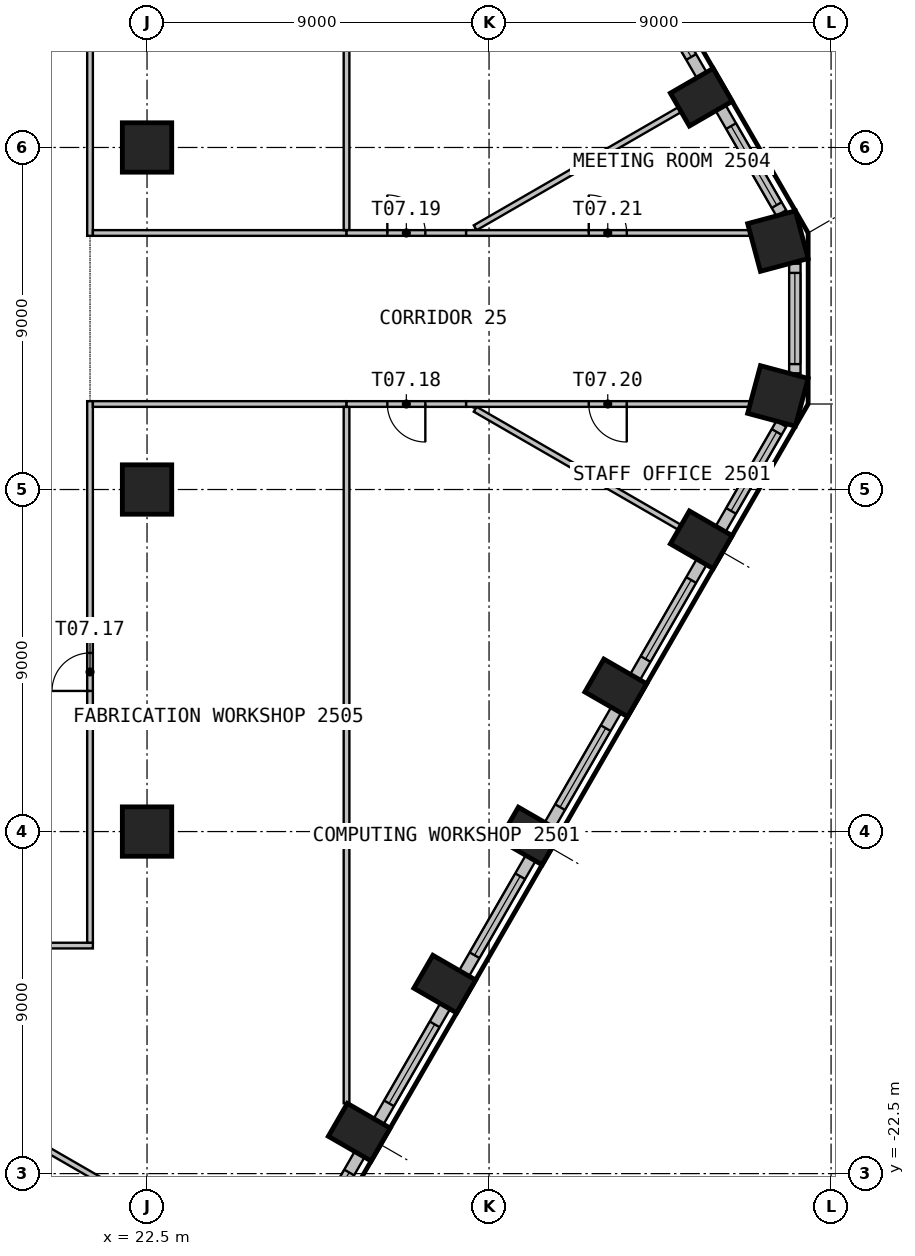
"""IFC4 building model, lengths in metres.
Left out: names, types, materials, properties, quantities, classifications, styles, units other than length and angle.
Written with IfcOpenShell. Run it as: python <this file> out.ifc"""

import sys

from ifc_helpers import new_model, si_unit, direction, frame, frame_2d, origin, origin_2d, place, context, subcontext, project, spatial, rectangle, circle, extrude, element, fill, save


model = new_model("IFC4")
c1 = context("Model", 3, precision=1e-05, world=origin(), true_north=direction((0.0, 1.0)))
c2 = subcontext(c1, "Body", "Model", "MODEL_VIEW")
j1 = project(units=[si_unit("LENGTHUNIT", "METRE"), si_unit("PLANEANGLEUNIT", "RADIAN")], contexts=[c1])
p1 = place(None, origin())
s1 = spatial("IfcSite", under=j1, at=p1, CompositionType="ELEMENT")
p2 = place(p1, origin())
s2 = spatial("IfcBuilding", under=s1, at=p2, CompositionType="ELEMENT")
p3 = place(p2, frame((0.0, 0.0, 104.7)))
s3 = spatial("IfcBuildingStorey", under=s2, at=p3, CompositionType="ELEMENT", Elevation=104.7)
for number, where, z_axis, x_axis in (
    (1, (28.084, -21.411, 0.0), (0.0, 0.0, 1.0), (0.5, 0.866, 0.0)),
    (2, (30.334, -17.513, 0.0), (0.0, 0.0, 1.0), (0.5, 0.866, 0.0)),
    (3, (32.584, -13.616, 0.0), (0.0, 0.0, 1.0), (0.5, 0.866, 0.0)),
    (4, (34.834, -9.719, 0.0), (0.0, 0.0, 1.0), (0.5, 0.866, 0.0)),
    (5, (37.084, -5.822, 0.0), (0.0, 0.0, 1.0), (0.5, 0.866, 0.0)),
):
    element("IfcColumn", number, at=place(p3, frame(where, z_axis=z_axis, x_axis=x_axis)), inside=s3, PredefinedType="COLUMN", context=c2, shape_type="SweptSolid", body=[
        extrude(rectangle(XDim=1.0, YDim=1.3, at=origin_2d()), origin(), (0.0, 0.0, 1.0), 3.525),
    ])
for number, where, z_axis, x_axis in (
    (6, (39.101, -2.037, 0.0), (0.0, 0.0, 1.0), (0.259, 0.966, 0.0)),
    (7, (39.101, 2.037, 0.0), (0.0, 0.0, 1.0), (-0.259, 0.966, 0.0)),
):
    element("IfcColumn", number, at=place(p3, frame(where, z_axis=z_axis, x_axis=x_axis)), inside=s3, PredefinedType="COLUMN", context=c2, shape_type="SweptSolid", body=[
        extrude(rectangle(XDim=1.3, YDim=1.3, at=origin_2d()), origin(), (0.0, 0.0, 1.0), 3.525),
    ])
p4 = place(p3, frame((37.084, 5.822, 0.0), z_axis=(0.0, 0.0, 1.0), x_axis=(-0.5, 0.866025403784, 0.0)))
e8 = element("IfcColumn", 8, at=p4, inside=s3, PredefinedType="COLUMN", context=c2, shape_type="SweptSolid", body=[
    extrude(rectangle(XDim=1.0, YDim=1.3, at=origin_2d()), origin(), (0.0, 0.0, 1.0), 3.525),
])
for number, where, z_axis, x_axis in (
    (9, (22.5, -13.5, 0.0), (0.0, 0.0, 1.0), (1.0, 0.0, 0.0)),
    (10, (22.5, -4.5, 0.0), (0.0, 0.0, 1.0), (1.0, 0.0, 0.0)),
    (11, (22.5, 4.5, 0.0), (0.0, 0.0, 1.0), (1.0, 0.0, 0.0)),
):
    element("IfcColumn", number, at=place(p3, frame(where, z_axis=z_axis, x_axis=x_axis)), inside=s3, PredefinedType="COLUMN", context=c2, shape_type="SweptSolid", body=[
        extrude(circle(Radius=0.65, at=origin_2d()), origin(), (0.0, 0.0, 1.0), 3.525),
    ])
p5 = place(p3, frame((26.344, -25.024, 0.0), z_axis=(0.0, 0.0, 1.0), x_axis=(0.499996256241, 0.866027565234, 0.0)))
e12 = element("IfcWall", 12, at=p5, inside=s3, PredefinedType="SOLIDWALL", context=c2, shape_type="SweptSolid", body=[
    extrude(rectangle(XDim=3.499, YDim=0.3, at=frame_2d((1.75, 0.0))), origin(), (0.0, 0.0, 1.0), 3.525),
])
p6 = place(p5, frame((0.55, 0.0, 0.9)))
e13 = element("IfcOpeningElement", 13, at=p6, cuts=e12, PredefinedType="OPENING", context=c2, shape_type="SweptSolid", body=[
    extrude(rectangle(XDim=2.4, YDim=2.1, at=frame_2d((1.2, 1.05))), frame((0.0, 0.16, 0.0), z_axis=(0.0, -1.0, 0.0), x_axis=(1.0, 0.0, 0.0)), (0.0, 0.0, 1.0), 0.32),
])
p7 = place(p3, frame((28.594, -21.127, 0.0), z_axis=(0.0, 0.0, 1.0), x_axis=(0.499996256241, 0.866027565234, 0.0)))
e14 = element("IfcWall", 14, at=p7, inside=s3, PredefinedType="SOLIDWALL", context=c2, shape_type="SweptSolid", body=[
    extrude(rectangle(XDim=3.499, YDim=0.3, at=frame_2d((1.75, 0.0))), origin(), (0.0, 0.0, 1.0), 3.525),
])
p8 = place(p7, frame((0.55, 0.0, 0.9)))
e15 = element("IfcOpeningElement", 15, at=p8, cuts=e14, PredefinedType="OPENING", context=c2, shape_type="SweptSolid", body=[
    extrude(rectangle(XDim=2.4, YDim=2.1, at=frame_2d((1.2, 1.05))), frame((0.0, 0.16, 0.0), z_axis=(0.0, -1.0, 0.0), x_axis=(1.0, 0.0, 0.0)), (0.0, 0.0, 1.0), 0.32),
])
p9 = place(p3, frame((30.844, -17.23, 0.0), z_axis=(0.0, 0.0, 1.0), x_axis=(0.499996256241, 0.866027565234, 0.0)))
e16 = element("IfcWall", 16, at=p9, inside=s3, PredefinedType="SOLIDWALL", context=c2, shape_type="SweptSolid", body=[
    extrude(rectangle(XDim=3.499, YDim=0.3, at=frame_2d((1.75, 0.0))), origin(), (0.0, 0.0, 1.0), 3.525),
])
p10 = place(p9, frame((0.55, 0.0, 0.9)))
e17 = element("IfcOpeningElement", 17, at=p10, cuts=e16, PredefinedType="OPENING", context=c2, shape_type="SweptSolid", body=[
    extrude(rectangle(XDim=2.4, YDim=2.1, at=frame_2d((1.2, 1.05))), frame((0.0, 0.16, 0.0), z_axis=(0.0, -1.0, 0.0), x_axis=(1.0, 0.0, 0.0)), (0.0, 0.0, 1.0), 0.32),
])
p11 = place(p3, frame((33.094, -13.333, 0.0), z_axis=(0.0, 0.0, 1.0), x_axis=(0.499996256241, 0.866027565234, 0.0)))
e18 = element("IfcWall", 18, at=p11, inside=s3, PredefinedType="SOLIDWALL", context=c2, shape_type="SweptSolid", body=[
    extrude(rectangle(XDim=3.499, YDim=0.3, at=frame_2d((1.75, 0.0))), origin(), (0.0, 0.0, 1.0), 3.525),
])
p12 = place(p11, frame((0.55, 0.0, 0.9)))
e19 = element("IfcOpeningElement", 19, at=p12, cuts=e18, PredefinedType="OPENING", context=c2, shape_type="SweptSolid", body=[
    extrude(rectangle(XDim=2.4, YDim=2.1, at=frame_2d((1.2, 1.05))), frame((0.0, 0.16, 0.0), z_axis=(0.0, -1.0, 0.0), x_axis=(1.0, 0.0, 0.0)), (0.0, 0.0, 1.0), 0.32),
])
p13 = place(p3, frame((35.344, -9.436, 0.0), z_axis=(0.0, 0.0, 1.0), x_axis=(0.499996256241, 0.866027565234, 0.0)))
e20 = element("IfcWall", 20, at=p13, inside=s3, PredefinedType="SOLIDWALL", context=c2, shape_type="SweptSolid", body=[
    extrude(rectangle(XDim=3.499, YDim=0.3, at=frame_2d((1.75, 0.0))), origin(), (0.0, 0.0, 1.0), 3.525),
])
p14 = place(p13, frame((0.55, 0.0, 0.9)))
e21 = element("IfcOpeningElement", 21, at=p14, cuts=e20, PredefinedType="OPENING", context=c2, shape_type="SweptSolid", body=[
    extrude(rectangle(XDim=2.4, YDim=2.1, at=frame_2d((1.2, 1.05))), frame((0.0, 0.16, 0.0), z_axis=(0.0, -1.0, 0.0), x_axis=(1.0, 0.0, 0.0)), (0.0, 0.0, 1.0), 0.32),
])
p15 = place(p3, frame((37.594, -5.539, 0.0), z_axis=(0.0, 0.0, 1.0), x_axis=(0.500004907028, 0.866022570692, 0.0)))
e22 = element("IfcWall", 22, at=p15, inside=s3, PredefinedType="SOLIDWALL", context=c2, shape_type="SweptSolid", body=[
    extrude(rectangle(XDim=3.192, YDim=0.3, at=frame_2d((1.596, 0.0))), origin(), (0.0, 0.0, 1.0), 3.525),
])
p16 = place(p15, frame((0.55, 0.0, 0.9)))
e23 = element("IfcOpeningElement", 23, at=p16, cuts=e22, PredefinedType="OPENING", context=c2, shape_type="SweptSolid", body=[
    extrude(rectangle(XDim=2.4, YDim=2.1, at=frame_2d((1.2, 1.05))), frame((0.0, 0.16, 0.0), z_axis=(0.0, -1.0, 0.0), x_axis=(1.0, 0.0, 0.0)), (0.0, 0.0, 1.0), 0.32),
])
p17 = place(p3, frame((39.547, -1.443, 0.0), z_axis=(0.0, 0.0, 1.0), x_axis=(0.0, 1.0, 0.0)))
e24 = element("IfcWall", 24, at=p17, inside=s3, PredefinedType="SOLIDWALL", context=c2, shape_type="SweptSolid", body=[
    extrude(rectangle(XDim=2.886, YDim=0.3, at=frame_2d((1.443, 0.0))), origin(), (0.0, 0.0, 1.0), 3.525),
])
p18 = place(p17, frame((0.243, 0.0, 0.9)))
e25 = element("IfcOpeningElement", 25, at=p18, cuts=e24, PredefinedType="OPENING", context=c2, shape_type="SweptSolid", body=[
    extrude(rectangle(XDim=2.4, YDim=2.1, at=frame_2d((1.2, 1.05))), frame((0.0, 0.16, 0.0), z_axis=(0.0, -1.0, 0.0), x_axis=(1.0, 0.0, 0.0)), (0.0, 0.0, 1.0), 0.32),
])
p19 = place(p3, frame((39.19, 2.774, 0.0), z_axis=(0.0, 0.0, 1.0), x_axis=(-0.500004907028, 0.866022570692, 0.0)))
e26 = element("IfcWall", 26, at=p19, inside=s3, PredefinedType="SOLIDWALL", context=c2, shape_type="SweptSolid", body=[
    extrude(rectangle(XDim=3.192, YDim=0.3, at=frame_2d((1.596, 0.0))), origin(), (0.0, 0.0, 1.0), 3.525),
])
p20 = place(p19, frame((0.243, 0.0, 0.9)))
e27 = element("IfcOpeningElement", 27, at=p20, cuts=e26, PredefinedType="OPENING", context=c2, shape_type="SweptSolid", body=[
    extrude(rectangle(XDim=2.4, YDim=2.1, at=frame_2d((1.2, 1.05))), frame((0.0, 0.16, 0.0), z_axis=(0.0, -1.0, 0.0), x_axis=(1.0, 0.0, 0.0)), (0.0, 0.0, 1.0), 0.32),
])
p21 = place(p3, frame((37.094, 6.406, 0.0), z_axis=(0.0, 0.0, 1.0), x_axis=(-0.499996256241, 0.866027565234, 0.0)))
e28 = element("IfcWall", 28, at=p21, inside=s3, PredefinedType="SOLIDWALL", context=c2, shape_type="SweptSolid", body=[
    extrude(rectangle(XDim=3.499, YDim=0.3, at=frame_2d((1.75, 0.0))), origin(), (0.0, 0.0, 1.0), 3.525),
])
p22 = place(p21, frame((0.55, 0.0, 0.9)))
e29 = element("IfcOpeningElement", 29, at=p22, cuts=e28, PredefinedType="OPENING", context=c2, shape_type="SweptSolid", body=[
    extrude(rectangle(XDim=2.4, YDim=2.1, at=frame_2d((1.2, 1.05))), frame((0.0, 0.16, 0.0), z_axis=(0.0, -1.0, 0.0), x_axis=(1.0, 0.0, 0.0)), (0.0, 0.0, 1.0), 0.32),
])
p23 = place(p3, frame((11.315, -16.925, 0.0), z_axis=(0.0, 0.0, 1.0), x_axis=(0.86600725109, -0.500031440071, 0.0)))
e30 = element("IfcWall", 30, at=p23, inside=s3, PredefinedType="PARTITIONING", context=c2, shape_type="SweptSolid", body=[
    extrude(rectangle(XDim=16.096, YDim=0.15, at=frame_2d((8.048, 0.0))), origin(), (0.0, 0.0, 1.0), 3.525),
])
p24 = place(p3, frame((11.25, -16.5, 0.0), z_axis=(0.0, 0.0, 1.0), x_axis=(1.0, 0.0, 0.0)))
e31 = element("IfcWall", 31, at=p24, inside=s3, PredefinedType="PARTITIONING", context=c2, shape_type="SweptSolid", body=[
    extrude(rectangle(XDim=9.825, YDim=0.15, at=frame_2d((4.913, 0.0))), origin(), (0.0, 0.0, 1.0), 3.525),
])
p25 = place(p3, frame((21.0, -16.425, 0.0), z_axis=(0.0, 0.0, 1.0), x_axis=(0.0, 1.0, 0.0)))
e32 = element("IfcWall", 32, at=p25, inside=s3, PredefinedType="PARTITIONING", context=c2, shape_type="SweptSolid", body=[
    extrude(rectangle(XDim=14.25, YDim=0.15, at=frame_2d((7.125, 0.0))), origin(), (0.0, 0.0, 1.0), 3.525),
])
p26 = place(p25, frame((6.625, 0.0, 0.0)))
e33 = element("IfcOpeningElement", 33, at=p26, cuts=e32, PredefinedType="OPENING", context=c2, shape_type="SweptSolid", body=[
    extrude(rectangle(XDim=1.0, YDim=2.1, at=frame_2d((0.5, 1.05))), frame((0.0, 0.085, 0.0), z_axis=(0.0, -1.0, 0.0), x_axis=(1.0, 0.0, 0.0)), (0.0, 0.0, 1.0), 0.17),
])
p27 = place(p3, frame((27.75, -2.25, 0.0), z_axis=(0.0, 0.0, 1.0), x_axis=(-1.0, 0.0, 0.0)))
e34 = element("IfcWall", 34, at=p27, inside=s3, PredefinedType="PARTITIONING", context=c2, shape_type="SweptSolid", body=[
    extrude(rectangle(XDim=6.675, YDim=0.15, at=frame_2d((3.337, 0.0))), origin(), (0.0, 0.0, 1.0), 3.525),
])
p28 = place(p3, frame((21.0, 2.175, 0.0), z_axis=(0.0, 0.0, 1.0), x_axis=(0.0, 1.0, 0.0)))
e35 = element("IfcWall", 35, at=p28, inside=s3, PredefinedType="PARTITIONING", context=c2, shape_type="SweptSolid", body=[
    extrude(rectangle(XDim=14.25, YDim=0.15, at=frame_2d((7.125, 0.0))), origin(), (0.0, 0.0, 1.0), 3.525),
])
p29 = place(p28, frame((6.625, 0.0, 0.0)))
e36 = element("IfcOpeningElement", 36, at=p29, cuts=e35, PredefinedType="OPENING", context=c2, shape_type="SweptSolid", body=[
    extrude(rectangle(XDim=1.0, YDim=2.1, at=frame_2d((0.5, 1.05))), frame((0.0, 0.085, 0.0), z_axis=(0.0, -1.0, 0.0), x_axis=(1.0, 0.0, 0.0)), (0.0, 0.0, 1.0), 0.17),
])
p30 = place(p3, frame((21.075, 2.25, 0.0), z_axis=(0.0, 0.0, 1.0), x_axis=(1.0, 0.0, 0.0)))
e37 = element("IfcWall", 37, at=p30, inside=s3, PredefinedType="PARTITIONING", context=c2, shape_type="SweptSolid", body=[
    extrude(rectangle(XDim=6.675, YDim=0.15, at=frame_2d((3.337, 0.0))), origin(), (0.0, 0.0, 1.0), 3.525),
])
p31 = place(p3, frame((27.75, -2.325, 0.0), z_axis=(0.0, 0.0, 1.0), x_axis=(0.0, -1.0, 0.0)))
e38 = element("IfcWall", 38, at=p31, inside=s3, PredefinedType="PARTITIONING", context=c2, shape_type="SweptSolid", body=[
    extrude(rectangle(XDim=18.324, YDim=0.15, at=frame_2d((9.162, 0.0))), origin(), (0.0, 0.0, 1.0), 3.525),
])
p32 = place(p3, frame((30.897, -2.25, 0.0), z_axis=(0.0, 0.0, 1.0), x_axis=(-1.0, 0.0, 0.0)))
e39 = element("IfcWall", 39, at=p32, inside=s3, PredefinedType="PARTITIONING", context=c2, shape_type="SweptSolid", body=[
    extrude(rectangle(XDim=3.147, YDim=0.15, at=frame_2d((1.573, 0.0))), origin(), (0.0, 0.0, 1.0), 3.525),
])
p33 = place(p32, frame((1.073, 0.0, 0.0)))
e40 = element("IfcOpeningElement", 40, at=p33, cuts=e39, PredefinedType="OPENING", context=c2, shape_type="SweptSolid", body=[
    extrude(rectangle(XDim=1.0, YDim=2.1, at=frame_2d((0.5, 1.05))), frame((0.0, 0.085, 0.0), z_axis=(0.0, -1.0, 0.0), x_axis=(1.0, 0.0, 0.0)), (0.0, 0.0, 1.0), 0.17),
])
p34 = place(p3, frame((27.75, 20.649, 0.0), z_axis=(0.0, 0.0, 1.0), x_axis=(0.0, -1.0, 0.0)))
e41 = element("IfcWall", 41, at=p34, inside=s3, PredefinedType="PARTITIONING", context=c2, shape_type="SweptSolid", body=[
    extrude(rectangle(XDim=18.324, YDim=0.15, at=frame_2d((9.162, 0.0))), origin(), (0.0, 0.0, 1.0), 3.525),
])
p35 = place(p3, frame((27.75, 2.25, 0.0), z_axis=(0.0, 0.0, 1.0), x_axis=(1.0, 0.0, 0.0)))
e42 = element("IfcWall", 42, at=p35, inside=s3, PredefinedType="PARTITIONING", context=c2, shape_type="SweptSolid", body=[
    extrude(rectangle(XDim=3.147, YDim=0.15, at=frame_2d((1.573, 0.0))), origin(), (0.0, 0.0, 1.0), 3.525),
])
p36 = place(p35, frame((1.073, 0.0, 0.0)))
e43 = element("IfcOpeningElement", 43, at=p36, cuts=e42, PredefinedType="OPENING", context=c2, shape_type="SweptSolid", body=[
    extrude(rectangle(XDim=1.0, YDim=2.1, at=frame_2d((0.5, 1.05))), frame((0.0, 0.085, 0.0), z_axis=(0.0, -1.0, 0.0), x_axis=(1.0, 0.0, 0.0)), (0.0, 0.0, 1.0), 0.17),
])
p37 = place(p3, frame((31.135, -2.387, 0.0), z_axis=(0.0, 0.0, 1.0), x_axis=(0.866007197923, -0.500031532152, 0.0)))
e44 = element("IfcWall", 44, at=p37, inside=s3, PredefinedType="PARTITIONING", context=c2, shape_type="SweptSolid", body=[
    extrude(rectangle(XDim=6.199, YDim=0.15, at=frame_2d((3.1, 0.0))), origin(), (0.0, 0.0, 1.0), 3.525),
])
p38 = place(p3, frame((38.35, -2.25, 0.0), z_axis=(0.0, 0.0, 1.0), x_axis=(-1.0, 0.0, 0.0)))
e45 = element("IfcWall", 45, at=p38, inside=s3, PredefinedType="PARTITIONING", context=c2, shape_type="SweptSolid", body=[
    extrude(rectangle(XDim=7.453, YDim=0.15, at=frame_2d((3.727, 0.0))), origin(), (0.0, 0.0, 1.0), 3.525),
])
p39 = place(p38, frame((3.227, 0.0, 0.0)))
e46 = element("IfcOpeningElement", 46, at=p39, cuts=e45, PredefinedType="OPENING", context=c2, shape_type="SweptSolid", body=[
    extrude(rectangle(XDim=1.0, YDim=2.1, at=frame_2d((0.5, 1.05))), frame((0.0, 0.085, 0.0), z_axis=(0.0, -1.0, 0.0), x_axis=(1.0, 0.0, 0.0)), (0.0, 0.0, 1.0), 0.17),
])
p40 = place(p3, frame((36.504, 5.487, 0.0), z_axis=(0.0, 0.0, 1.0), x_axis=(-0.866007197923, -0.500031532152, 0.0)))
e47 = element("IfcWall", 47, at=p40, inside=s3, PredefinedType="PARTITIONING", context=c2, shape_type="SweptSolid", body=[
    extrude(rectangle(XDim=6.199, YDim=0.15, at=frame_2d((3.1, 0.0))), origin(), (0.0, 0.0, 1.0), 3.525),
])
p41 = place(p3, frame((30.897, 2.25, 0.0), z_axis=(0.0, 0.0, 1.0), x_axis=(1.0, 0.0, 0.0)))
e48 = element("IfcWall", 48, at=p41, inside=s3, PredefinedType="PARTITIONING", context=c2, shape_type="SweptSolid", body=[
    extrude(rectangle(XDim=7.453, YDim=0.15, at=frame_2d((3.727, 0.0))), origin(), (0.0, 0.0, 1.0), 3.525),
])
p42 = place(p41, frame((3.227, 0.0, 0.0)))
e49 = element("IfcOpeningElement", 49, at=p42, cuts=e48, PredefinedType="OPENING", context=c2, shape_type="SweptSolid", body=[
    extrude(rectangle(XDim=1.0, YDim=2.1, at=frame_2d((0.5, 1.05))), frame((0.0, 0.085, 0.0), z_axis=(0.0, -1.0, 0.0), x_axis=(1.0, 0.0, 0.0)), (0.0, 0.0, 1.0), 0.17),
])
p43 = place(p6, origin())
e50 = element("IfcWindow", 50, at=p43, inside=s3, PartitioningType="SINGLE_PANEL", PredefinedType="WINDOW", context=c2, shape_type="SweptSolid", body=[
    extrude(rectangle(XDim=2.4, YDim=2.1, at=frame_2d((1.2, 1.05))), frame((0.0, 0.03, 0.0), z_axis=(0.0, -1.0, 0.0), x_axis=(1.0, 0.0, 0.0)), (0.0, 0.0, 1.0), 0.06),
])
fill(e13, e50)
p44 = place(p8, origin())
e51 = element("IfcWindow", 51, at=p44, inside=s3, PartitioningType="SINGLE_PANEL", PredefinedType="WINDOW", context=c2, shape_type="SweptSolid", body=[
    extrude(rectangle(XDim=2.4, YDim=2.1, at=frame_2d((1.2, 1.05))), frame((0.0, 0.03, 0.0), z_axis=(0.0, -1.0, 0.0), x_axis=(1.0, 0.0, 0.0)), (0.0, 0.0, 1.0), 0.06),
])
fill(e15, e51)
p45 = place(p10, origin())
e52 = element("IfcWindow", 52, at=p45, inside=s3, PartitioningType="SINGLE_PANEL", PredefinedType="WINDOW", context=c2, shape_type="SweptSolid", body=[
    extrude(rectangle(XDim=2.4, YDim=2.1, at=frame_2d((1.2, 1.05))), frame((0.0, 0.03, 0.0), z_axis=(0.0, -1.0, 0.0), x_axis=(1.0, 0.0, 0.0)), (0.0, 0.0, 1.0), 0.06),
])
fill(e17, e52)
p46 = place(p12, origin())
e53 = element("IfcWindow", 53, at=p46, inside=s3, PartitioningType="SINGLE_PANEL", PredefinedType="WINDOW", context=c2, shape_type="SweptSolid", body=[
    extrude(rectangle(XDim=2.4, YDim=2.1, at=frame_2d((1.2, 1.05))), frame((0.0, 0.03, 0.0), z_axis=(0.0, -1.0, 0.0), x_axis=(1.0, 0.0, 0.0)), (0.0, 0.0, 1.0), 0.06),
])
fill(e19, e53)
p47 = place(p14, origin())
e54 = element("IfcWindow", 54, at=p47, inside=s3, PartitioningType="SINGLE_PANEL", PredefinedType="WINDOW", context=c2, shape_type="SweptSolid", body=[
    extrude(rectangle(XDim=2.4, YDim=2.1, at=frame_2d((1.2, 1.05))), frame((0.0, 0.03, 0.0), z_axis=(0.0, -1.0, 0.0), x_axis=(1.0, 0.0, 0.0)), (0.0, 0.0, 1.0), 0.06),
])
fill(e21, e54)
p48 = place(p16, origin())
e55 = element("IfcWindow", 55, at=p48, inside=s3, PartitioningType="SINGLE_PANEL", PredefinedType="WINDOW", context=c2, shape_type="SweptSolid", body=[
    extrude(rectangle(XDim=2.4, YDim=2.1, at=frame_2d((1.2, 1.05))), frame((0.0, 0.03, 0.0), z_axis=(0.0, -1.0, 0.0), x_axis=(1.0, 0.0, 0.0)), (0.0, 0.0, 1.0), 0.06),
])
fill(e23, e55)
p49 = place(p18, origin())
e56 = element("IfcWindow", 56, at=p49, inside=s3, PartitioningType="SINGLE_PANEL", PredefinedType="WINDOW", context=c2, shape_type="SweptSolid", body=[
    extrude(rectangle(XDim=2.4, YDim=2.1, at=frame_2d((1.2, 1.05))), frame((0.0, 0.03, 0.0), z_axis=(0.0, -1.0, 0.0), x_axis=(1.0, 0.0, 0.0)), (0.0, 0.0, 1.0), 0.06),
])
fill(e25, e56)
p50 = place(p20, origin())
e57 = element("IfcWindow", 57, at=p50, inside=s3, PartitioningType="SINGLE_PANEL", PredefinedType="WINDOW", context=c2, shape_type="SweptSolid", body=[
    extrude(rectangle(XDim=2.4, YDim=2.1, at=frame_2d((1.2, 1.05))), frame((0.0, 0.03, 0.0), z_axis=(0.0, -1.0, 0.0), x_axis=(1.0, 0.0, 0.0)), (0.0, 0.0, 1.0), 0.06),
])
fill(e27, e57)
p51 = place(p22, origin())
e58 = element("IfcWindow", 58, at=p51, inside=s3, PartitioningType="SINGLE_PANEL", PredefinedType="WINDOW", context=c2, shape_type="SweptSolid", body=[
    extrude(rectangle(XDim=2.4, YDim=2.1, at=frame_2d((1.2, 1.05))), frame((0.0, 0.03, 0.0), z_axis=(0.0, -1.0, 0.0), x_axis=(1.0, 0.0, 0.0)), (0.0, 0.0, 1.0), 0.06),
])
fill(e29, e58)
p52 = place(p26, origin())
e59 = element("IfcDoor", 59, at=p52, inside=s3, OperationType="SINGLE_SWING_LEFT", PredefinedType="DOOR", context=c2, shape_type="SweptSolid", body=[
    extrude(rectangle(XDim=1.0, YDim=2.1, at=frame_2d((0.5, 1.05))), frame((0.0, 0.025, 0.0), z_axis=(0.0, -1.0, 0.0), x_axis=(1.0, 0.0, 0.0)), (0.0, 0.0, 1.0), 0.05),
])
fill(e33, e59)
p53 = place(p33, origin())
e60 = element("IfcDoor", 60, at=p53, inside=s3, OperationType="SINGLE_SWING_RIGHT", PredefinedType="DOOR", context=c2, shape_type="SweptSolid", body=[
    extrude(rectangle(XDim=1.0, YDim=2.1, at=frame_2d((0.5, 1.05))), frame((0.0, 0.025, 0.0), z_axis=(0.0, -1.0, 0.0), x_axis=(1.0, 0.0, 0.0)), (0.0, 0.0, 1.0), 0.05),
])
fill(e40, e60)
p54 = place(p36, origin())
e61 = element("IfcDoor", 61, at=p54, inside=s3, OperationType="SINGLE_SWING_LEFT", PredefinedType="DOOR", context=c2, shape_type="SweptSolid", body=[
    extrude(rectangle(XDim=1.0, YDim=2.1, at=frame_2d((0.5, 1.05))), frame((0.0, 0.025, 0.0), z_axis=(0.0, -1.0, 0.0), x_axis=(1.0, 0.0, 0.0)), (0.0, 0.0, 1.0), 0.05),
])
fill(e43, e61)
p55 = place(p39, origin())
e62 = element("IfcDoor", 62, at=p55, inside=s3, OperationType="SINGLE_SWING_RIGHT", PredefinedType="DOOR", context=c2, shape_type="SweptSolid", body=[
    extrude(rectangle(XDim=1.0, YDim=2.1, at=frame_2d((0.5, 1.05))), frame((0.0, 0.025, 0.0), z_axis=(0.0, -1.0, 0.0), x_axis=(1.0, 0.0, 0.0)), (0.0, 0.0, 1.0), 0.05),
])
fill(e46, e62)
p56 = place(p42, origin())
e63 = element("IfcDoor", 63, at=p56, inside=s3, OperationType="SINGLE_SWING_RIGHT", PredefinedType="DOOR", context=c2, shape_type="SweptSolid", body=[
    extrude(rectangle(XDim=1.0, YDim=2.1, at=frame_2d((0.5, 1.05))), frame((0.0, 0.025, 0.0), z_axis=(0.0, -1.0, 0.0), x_axis=(1.0, 0.0, 0.0)), (0.0, 0.0, 1.0), 0.05),
])
fill(e49, e63)
save(model, sys.argv[1])
